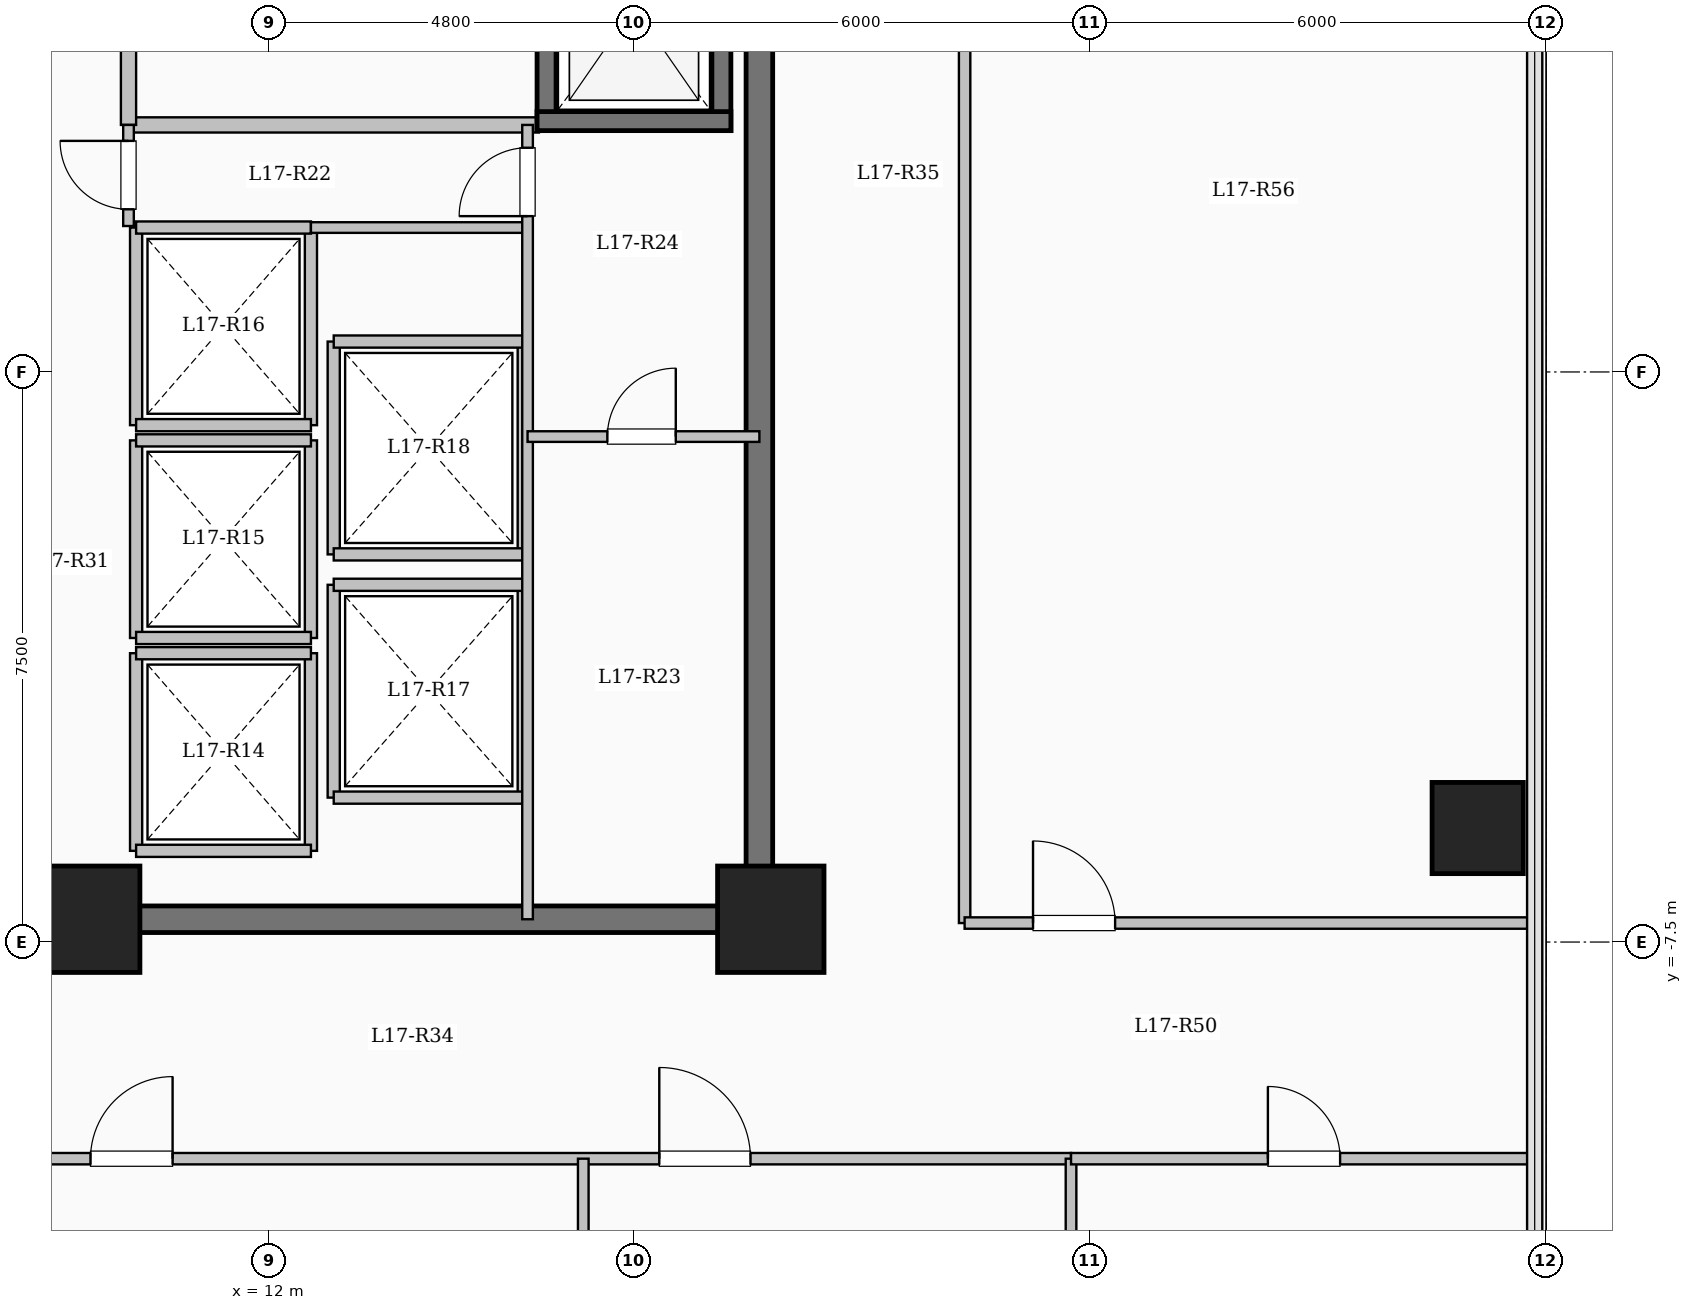
"""IFC4 building model, lengths in metres.
Left out: names, types, materials, properties, quantities, classifications, styles, units other than length and angle.
Written with IfcOpenShell. Run it as: python <this file> out.ifc"""

import sys

from ifc_helpers import new_model, si_unit, direction, frame, frame_2d, origin, origin_2d, place, context, subcontext, project, spatial, rectangle, extrude, element, fill, save


model = new_model("IFC4")
c1 = context("Model", 3, precision=1e-05, world=origin(), true_north=direction((0.0, 1.0)))
c2 = subcontext(c1, "Body", "Model", "MODEL_VIEW")
j1 = project(units=[si_unit("LENGTHUNIT", "METRE"), si_unit("PLANEANGLEUNIT", "RADIAN")], contexts=[c1])
p1 = place(None, origin())
s1 = spatial("IfcSite", under=j1, at=p1, CompositionType="ELEMENT")
p2 = place(p1, origin())
s2 = spatial("IfcBuilding", under=s1, at=p2, CompositionType="ELEMENT")
p3 = place(p2, frame((0.0, 0.0, 64.2)))
s3 = spatial("IfcBuildingStorey", under=s2, at=p3, CompositionType="ELEMENT", Elevation=64.2)
for number, where, z_axis, x_axis in (
    (1, (9.6, -7.2, 0.0), (0.0, 0.0, 1.0), (1.0, 0.0, 0.0)),
    (2, (18.6, -7.2, 0.0), (0.0, 0.0, 1.0), (1.0, 0.0, 0.0)),
):
    element("IfcColumn", number, at=place(p3, frame(where, z_axis=z_axis, x_axis=x_axis)), inside=s3, PredefinedType="COLUMN", context=c2, shape_type="SweptSolid", body=[
        extrude(rectangle(XDim=1.4, YDim=1.4, at=origin_2d()), origin(), (0.0, 0.0, 1.0), 4.5),
    ])
p4 = place(p3, frame((27.9, -6.0, 0.0), z_axis=(0.0, 0.0, 1.0), x_axis=(1.0, 0.0, 0.0)))
e3 = element("IfcColumn", 3, at=p4, inside=s3, PredefinedType="COLUMN", context=c2, shape_type="SweptSolid", body=[
    extrude(rectangle(XDim=1.2, YDim=1.2, at=origin_2d()), origin(), (0.0, 0.0, 1.0), 4.5),
])
p5 = place(p3, frame((10.15, 3.25, 0.0), z_axis=(0.0, 0.0, 1.0), x_axis=(1.0, 0.0, 0.0)))
e4 = element("IfcWall", 4, at=p5, inside=s3, PredefinedType="SOLIDWALL", context=c2, shape_type="SweptSolid", body=[
    extrude(rectangle(XDim=5.4, YDim=0.2, at=frame_2d((2.7, 0.0))), origin(), (0.0, 0.0, 1.0), 4.2),
])
p6 = place(p3, frame((10.15, 3.25, 0.0), z_axis=(0.0, 0.0, 1.0), x_axis=(0.0, 1.0, 0.0)))
e5 = element("IfcWall", 5, at=p6, inside=s3, PredefinedType="SOLIDWALL", context=c2, shape_type="SweptSolid", body=[
    extrude(rectangle(XDim=3.25, YDim=0.2, at=frame_2d((1.625, 0.0))), origin(), (0.0, 0.0, 1.0), 4.2),
])
p7 = place(p6, frame((1.1, 0.0, 0.0)))
e6 = element("IfcOpeningElement", 6, at=p7, cuts=e5, PredefinedType="OPENING", context=c2, shape_type="SweptSolid", body=[
    extrude(rectangle(XDim=1.02, YDim=2.15, at=frame_2d((0.51, 1.075))), frame((0.0, 0.11, 0.0), z_axis=(0.0, -1.0, 0.0), x_axis=(1.0, 0.0, 0.0)), (0.0, 0.0, 1.0), 0.22),
])
p8 = place(p3, frame((15.65, 3.175, 0.0), z_axis=(0.0, 0.0, 1.0), x_axis=(0.0, 1.0, 0.0)))
e7 = element("IfcWall", 7, at=p8, inside=s3, PredefinedType="SHEAR", context=c2, shape_type="SweptSolid", body=[
    extrude(rectangle(XDim=3.25, YDim=0.25, at=frame_2d((1.625, 0.0))), origin(), (0.0, 0.0, 1.0), 4.5),
])
p9 = place(p8, frame((1.075, 0.0, 0.0)))
e8 = element("IfcOpeningElement", 8, at=p9, cuts=e7, PredefinedType="OPENING", context=c2, shape_type="SweptSolid", body=[
    extrude(rectangle(XDim=1.1, YDim=2.15, at=frame_2d((0.55, 1.075))), frame((0.0, 0.135, 0.0), z_axis=(0.0, -1.0, 0.0), x_axis=(1.0, 0.0, 0.0)), (0.0, 0.0, 1.0), 0.27),
])
p10 = place(p3, frame((17.95, 3.175, 0.0), z_axis=(0.0, 0.0, 1.0), x_axis=(0.0, 1.0, 0.0)))
e9 = element("IfcWall", 9, at=p10, inside=s3, PredefinedType="SHEAR", context=c2, shape_type="SweptSolid", body=[
    extrude(rectangle(XDim=3.25, YDim=0.25, at=frame_2d((1.625, 0.0))), origin(), (0.0, 0.0, 1.0), 4.5),
])
p11 = place(p3, frame((15.525, 3.3, 0.0), z_axis=(0.0, 0.0, 1.0), x_axis=(1.0, 0.0, 0.0)))
e10 = element("IfcWall", 10, at=p11, inside=s3, PredefinedType="SHEAR", context=c2, shape_type="SweptSolid", body=[
    extrude(rectangle(XDim=2.55, YDim=0.25, at=frame_2d((1.275, 0.0))), origin(), (0.0, 0.0, 1.0), 4.5),
])
for number, where, z_axis, x_axis in (
    (11, (10.25, -6.3, 0.0), (0.0, 0.0, 1.0), (0.0, 1.0, 0.0)),
    (12, (12.55, -6.3, 0.0), (0.0, 0.0, 1.0), (0.0, 1.0, 0.0)),
):
    element("IfcWall", number, at=place(p3, frame(where, z_axis=z_axis, x_axis=x_axis)), inside=s3, PredefinedType="SOLIDWALL", context=c2, shape_type="SweptSolid", body=[
        extrude(rectangle(XDim=2.6, YDim=0.16, at=frame_2d((1.3, 0.0))), origin(), (0.0, 0.0, 1.0), 4.2),
    ])
for number, where, z_axis, x_axis in (
    (13, (10.25, -6.3, 0.0), (0.0, 0.0, 1.0), (1.0, 0.0, 0.0)),
    (14, (10.25, -3.7, 0.0), (0.0, 0.0, 1.0), (1.0, 0.0, 0.0)),
):
    element("IfcWall", number, at=place(p3, frame(where, z_axis=z_axis, x_axis=x_axis)), inside=s3, PredefinedType="SOLIDWALL", context=c2, shape_type="SweptSolid", body=[
        extrude(rectangle(XDim=2.3, YDim=0.16, at=frame_2d((1.15, 0.0))), origin(), (0.0, 0.0, 1.0), 4.2),
    ])
for number, where, z_axis, x_axis in (
    (15, (10.25, -3.5, 0.0), (0.0, 0.0, 1.0), (0.0, 1.0, 0.0)),
    (16, (12.55, -3.5, 0.0), (0.0, 0.0, 1.0), (0.0, 1.0, 0.0)),
):
    element("IfcWall", number, at=place(p3, frame(where, z_axis=z_axis, x_axis=x_axis)), inside=s3, PredefinedType="SOLIDWALL", context=c2, shape_type="SweptSolid", body=[
        extrude(rectangle(XDim=2.6, YDim=0.16, at=frame_2d((1.3, 0.0))), origin(), (0.0, 0.0, 1.0), 4.2),
    ])
for number, where, z_axis, x_axis in (
    (17, (10.25, -3.5, 0.0), (0.0, 0.0, 1.0), (1.0, 0.0, 0.0)),
    (18, (10.25, -0.9, 0.0), (0.0, 0.0, 1.0), (1.0, 0.0, 0.0)),
):
    element("IfcWall", number, at=place(p3, frame(where, z_axis=z_axis, x_axis=x_axis)), inside=s3, PredefinedType="SOLIDWALL", context=c2, shape_type="SweptSolid", body=[
        extrude(rectangle(XDim=2.3, YDim=0.16, at=frame_2d((1.15, 0.0))), origin(), (0.0, 0.0, 1.0), 4.2),
    ])
for number, where, z_axis, x_axis in (
    (19, (10.25, -0.7, 0.0), (0.0, 0.0, 1.0), (0.0, 1.0, 0.0)),
    (20, (12.55, -0.7, 0.0), (0.0, 0.0, 1.0), (0.0, 1.0, 0.0)),
):
    element("IfcWall", number, at=place(p3, frame(where, z_axis=z_axis, x_axis=x_axis)), inside=s3, PredefinedType="SOLIDWALL", context=c2, shape_type="SweptSolid", body=[
        extrude(rectangle(XDim=2.6, YDim=0.16, at=frame_2d((1.3, 0.0))), origin(), (0.0, 0.0, 1.0), 4.2),
    ])
for number, where, z_axis, x_axis in (
    (21, (10.25, -0.7, 0.0), (0.0, 0.0, 1.0), (1.0, 0.0, 0.0)),
    (22, (10.25, 1.9, 0.0), (0.0, 0.0, 1.0), (1.0, 0.0, 0.0)),
):
    element("IfcWall", number, at=place(p3, frame(where, z_axis=z_axis, x_axis=x_axis)), inside=s3, PredefinedType="SOLIDWALL", context=c2, shape_type="SweptSolid", body=[
        extrude(rectangle(XDim=2.3, YDim=0.16, at=frame_2d((1.15, 0.0))), origin(), (0.0, 0.0, 1.0), 4.2),
    ])
for number, where, z_axis, x_axis in (
    (23, (12.85, -5.6, 0.0), (0.0, 0.0, 1.0), (0.0, 1.0, 0.0)),
    (24, (15.35, -5.6, 0.0), (0.0, 0.0, 1.0), (0.0, 1.0, 0.0)),
):
    element("IfcWall", number, at=place(p3, frame(where, z_axis=z_axis, x_axis=x_axis)), inside=s3, PredefinedType="SOLIDWALL", context=c2, shape_type="SweptSolid", body=[
        extrude(rectangle(XDim=2.8, YDim=0.16, at=frame_2d((1.4, 0.0))), origin(), (0.0, 0.0, 1.0), 4.2),
    ])
for number, where, z_axis, x_axis in (
    (25, (12.85, -5.6, 0.0), (0.0, 0.0, 1.0), (1.0, 0.0, 0.0)),
    (26, (12.85, -2.8, 0.0), (0.0, 0.0, 1.0), (1.0, 0.0, 0.0)),
):
    element("IfcWall", number, at=place(p3, frame(where, z_axis=z_axis, x_axis=x_axis)), inside=s3, PredefinedType="SOLIDWALL", context=c2, shape_type="SweptSolid", body=[
        extrude(rectangle(XDim=2.5, YDim=0.16, at=frame_2d((1.25, 0.0))), origin(), (0.0, 0.0, 1.0), 4.2),
    ])
for number, where, z_axis, x_axis in (
    (27, (12.85, -2.4, 0.0), (0.0, 0.0, 1.0), (0.0, 1.0, 0.0)),
    (28, (15.35, -2.4, 0.0), (0.0, 0.0, 1.0), (0.0, 1.0, 0.0)),
):
    element("IfcWall", number, at=place(p3, frame(where, z_axis=z_axis, x_axis=x_axis)), inside=s3, PredefinedType="SOLIDWALL", context=c2, shape_type="SweptSolid", body=[
        extrude(rectangle(XDim=2.8, YDim=0.16, at=frame_2d((1.4, 0.0))), origin(), (0.0, 0.0, 1.0), 4.2),
    ])
for number, where, z_axis, x_axis in (
    (29, (12.85, -2.4, 0.0), (0.0, 0.0, 1.0), (1.0, 0.0, 0.0)),
    (30, (12.85, 0.4, 0.0), (0.0, 0.0, 1.0), (1.0, 0.0, 0.0)),
):
    element("IfcWall", number, at=place(p3, frame(where, z_axis=z_axis, x_axis=x_axis)), inside=s3, PredefinedType="SOLIDWALL", context=c2, shape_type="SweptSolid", body=[
        extrude(rectangle(XDim=2.5, YDim=0.16, at=frame_2d((1.25, 0.0))), origin(), (0.0, 0.0, 1.0), 4.2),
    ])
p12 = place(p3, frame((18.45, -7.375, 0.0), z_axis=(0.0, 0.0, 1.0), x_axis=(0.0, 1.0, 0.0)))
e31 = element("IfcWall", 31, at=p12, inside=s3, PredefinedType="SHEAR", context=c2, shape_type="SweptSolid", body=[
    extrude(rectangle(XDim=14.05, YDim=0.35, at=frame_2d((7.025, 0.0))), origin(), (0.0, 0.0, 1.0), 4.5),
])
p13 = place(p3, frame((10.075, -7.2, 0.0), z_axis=(0.0, 0.0, 1.0), x_axis=(1.0, 0.0, 0.0)))
e32 = element("IfcWall", 32, at=p13, inside=s3, PredefinedType="SHEAR", context=c2, shape_type="SweptSolid", body=[
    extrude(rectangle(XDim=8.55, YDim=0.35, at=frame_2d((4.275, 0.0))), origin(), (0.0, 0.0, 1.0), 4.5),
])
p14 = place(p3, frame((12.55, 1.9, 0.0), z_axis=(0.0, 0.0, 1.0), x_axis=(1.0, 0.0, 0.0)))
e33 = element("IfcWall", 33, at=p14, inside=s3, PredefinedType="PARTITIONING", context=c2, shape_type="SweptSolid", body=[
    extrude(rectangle(XDim=2.85, YDim=0.14, at=frame_2d((1.425, 0.0))), origin(), (0.0, 0.0, 1.0), 4.2),
])
p15 = place(p3, frame((10.15, 1.92, 0.0), z_axis=(0.0, 0.0, 1.0), x_axis=(0.0, 1.0, 0.0)))
e34 = element("IfcWall", 34, at=p15, inside=s3, PredefinedType="PARTITIONING", context=c2, shape_type="SweptSolid", body=[
    extrude(rectangle(XDim=1.33, YDim=0.14, at=frame_2d((0.665, 0.0))), origin(), (0.0, 0.0, 1.0), 4.2),
])
p16 = place(p15, frame((0.22, 0.0, 0.0)))
e35 = element("IfcOpeningElement", 35, at=p16, cuts=e34, PredefinedType="OPENING", context=c2, shape_type="SweptSolid", body=[
    extrude(rectangle(XDim=0.9, YDim=2.08, at=frame_2d((0.45, 1.04))), frame((0.0, 0.08, 0.0), z_axis=(0.0, -1.0, 0.0), x_axis=(1.0, 0.0, 0.0)), (0.0, 0.0, 1.0), 0.16),
])
p17 = place(p3, frame((15.4, -7.2, 0.0), z_axis=(0.0, 0.0, 1.0), x_axis=(0.0, 1.0, 0.0)))
e36 = element("IfcWall", 36, at=p17, inside=s3, PredefinedType="PARTITIONING", context=c2, shape_type="SweptSolid", body=[
    extrude(rectangle(XDim=10.45, YDim=0.14, at=frame_2d((5.225, 0.0))), origin(), (0.0, 0.0, 1.0), 4.2),
])
p18 = place(p17, frame((9.25, 0.0, 0.0)))
e37 = element("IfcOpeningElement", 37, at=p18, cuts=e36, PredefinedType="OPENING", context=c2, shape_type="SweptSolid", body=[
    extrude(rectangle(XDim=0.9, YDim=2.08, at=frame_2d((0.45, 1.04))), frame((0.0, 0.08, 0.0), z_axis=(0.0, -1.0, 0.0), x_axis=(1.0, 0.0, 0.0)), (0.0, 0.0, 1.0), 0.16),
])
p19 = place(p3, frame((15.4, -0.85, 0.0), z_axis=(0.0, 0.0, 1.0), x_axis=(1.0, 0.0, 0.0)))
e38 = element("IfcWall", 38, at=p19, inside=s3, PredefinedType="PARTITIONING", context=c2, shape_type="SweptSolid", body=[
    extrude(rectangle(XDim=3.05, YDim=0.14, at=frame_2d((1.525, 0.0))), origin(), (0.0, 0.0, 1.0), 4.2),
])
p20 = place(p19, frame((1.05, 0.0, 0.0)))
e39 = element("IfcOpeningElement", 39, at=p20, cuts=e38, PredefinedType="OPENING", context=c2, shape_type="SweptSolid", body=[
    extrude(rectangle(XDim=0.9, YDim=2.08, at=frame_2d((0.45, 1.04))), frame((0.0, 0.08, 0.0), z_axis=(0.0, -1.0, 0.0), x_axis=(1.0, 0.0, 0.0)), (0.0, 0.0, 1.0), 0.16),
])
p21 = place(p3, frame((21.15, -7.25, 0.0), z_axis=(0.0, 0.0, 1.0), x_axis=(0.0, 1.0, 0.0)))
e40 = element("IfcWall", 40, at=p21, inside=s3, PredefinedType="PARTITIONING", context=c2, shape_type="SweptSolid", body=[
    extrude(rectangle(XDim=18.0, YDim=0.15, at=frame_2d((9.0, 0.0))), origin(), (0.0, 0.0, 1.0), 3.635),
])
p22 = place(p3, frame((8.55, -10.35, 0.0), z_axis=(0.0, 0.0, 1.0), x_axis=(1.0, 0.0, 0.0)))
e41 = element("IfcWall", 41, at=p22, inside=s3, PredefinedType="PARTITIONING", context=c2, shape_type="SweptSolid", body=[
    extrude(rectangle(XDim=14.0, YDim=0.15, at=frame_2d((7.0, 0.0))), origin(), (0.0, 0.0, 1.0), 4.2),
])
p23 = place(p22, frame((1.1, 0.0, 0.0)))
e42 = element("IfcOpeningElement", 42, at=p23, cuts=e41, PredefinedType="OPENING", context=c2, shape_type="SweptSolid", body=[
    extrude(rectangle(XDim=1.08, YDim=2.15, at=frame_2d((0.54, 1.075))), frame((0.0, 0.085, 0.0), z_axis=(0.0, -1.0, 0.0), x_axis=(1.0, 0.0, 0.0)), (0.0, 0.0, 1.0), 0.17),
])
p24 = place(p22, frame((8.583, 0.0, 0.0)))
e43 = element("IfcOpeningElement", 43, at=p24, cuts=e41, PredefinedType="OPENING", context=c2, shape_type="SweptSolid", body=[
    extrude(rectangle(XDim=1.2, YDim=2.15, at=frame_2d((0.6, 1.075))), frame((0.0, 0.085, 0.0), z_axis=(0.0, -1.0, 0.0), x_axis=(1.0, 0.0, 0.0)), (0.0, 0.0, 1.0), 0.17),
])
p25 = place(p3, frame((16.133, -23.6, 0.0), z_axis=(0.0, 0.0, 1.0), x_axis=(0.0, 1.0, 0.0)))
e44 = element("IfcWall", 44, at=p25, inside=s3, PredefinedType="PARTITIONING", context=c2, shape_type="SweptSolid", body=[
    extrude(rectangle(XDim=13.25, YDim=0.14, at=frame_2d((6.625, 0.0))), origin(), (0.0, 0.0, 1.0), 4.2),
])
p26 = place(p3, frame((21.15, -7.25, 0.0), z_axis=(0.0, 0.0, 1.0), x_axis=(1.0, 0.0, 0.0)))
e45 = element("IfcWall", 45, at=p26, inside=s3, PredefinedType="PARTITIONING", context=c2, shape_type="SweptSolid", body=[
    extrude(rectangle(XDim=7.53, YDim=0.15, at=frame_2d((3.765, 0.0))), origin(), (0.0, 0.0, 1.0), 4.2),
])
p27 = place(p26, frame((0.9, 0.0, 0.0)))
e46 = element("IfcOpeningElement", 46, at=p27, cuts=e45, PredefinedType="OPENING", context=c2, shape_type="SweptSolid", body=[
    extrude(rectangle(XDim=1.08, YDim=2.15, at=frame_2d((0.54, 1.075))), frame((0.0, 0.085, 0.0), z_axis=(0.0, -1.0, 0.0), x_axis=(1.0, 0.0, 0.0)), (0.0, 0.0, 1.0), 0.17),
])
p28 = place(p3, frame((22.55, -19.05, 0.0), z_axis=(0.0, 0.0, 1.0), x_axis=(0.0, 1.0, 0.0)))
e47 = element("IfcWall", 47, at=p28, inside=s3, PredefinedType="PARTITIONING", context=c2, shape_type="SweptSolid", body=[
    extrude(rectangle(XDim=8.7, YDim=0.14, at=frame_2d((4.35, 0.0))), origin(), (0.0, 0.0, 1.0), 4.2),
])
p29 = place(p3, frame((22.55, -10.35, 0.0), z_axis=(0.0, 0.0, 1.0), x_axis=(1.0, 0.0, 0.0)))
e48 = element("IfcWall", 48, at=p29, inside=s3, PredefinedType="PARTITIONING", context=c2, shape_type="SweptSolid", body=[
    extrude(rectangle(XDim=6.13, YDim=0.15, at=frame_2d((3.065, 0.0))), origin(), (0.0, 0.0, 1.0), 4.2),
])
p30 = place(p29, frame((2.59, 0.0, 0.0)))
e49 = element("IfcOpeningElement", 49, at=p30, cuts=e48, PredefinedType="OPENING", context=c2, shape_type="SweptSolid", body=[
    extrude(rectangle(XDim=0.95, YDim=2.15, at=frame_2d((0.475, 1.075))), frame((0.0, 0.085, 0.0), z_axis=(0.0, -1.0, 0.0), x_axis=(1.0, 0.0, 0.0)), (0.0, 0.0, 1.0), 0.17),
])
p31 = place(p16, origin())
e50 = element("IfcDoor", 50, at=p31, inside=s3, OperationType="SINGLE_SWING_RIGHT", PredefinedType="DOOR", context=c2, shape_type="SweptSolid", body=[
    extrude(rectangle(XDim=0.9, YDim=2.08, at=frame_2d((0.45, 1.04))), frame((0.0, 0.025, 0.0), z_axis=(0.0, -1.0, 0.0), x_axis=(1.0, 0.0, 0.0)), (0.0, 0.0, 1.0), 0.05),
])
fill(e35, e50)
p32 = place(p18, origin())
e51 = element("IfcDoor", 51, at=p32, inside=s3, OperationType="SINGLE_SWING_LEFT", PredefinedType="DOOR", context=c2, shape_type="SweptSolid", body=[
    extrude(rectangle(XDim=0.9, YDim=2.08, at=frame_2d((0.45, 1.04))), frame((0.0, 0.025, 0.0), z_axis=(0.0, -1.0, 0.0), x_axis=(1.0, 0.0, 0.0)), (0.0, 0.0, 1.0), 0.05),
])
fill(e37, e51)
p33 = place(p20, origin())
e52 = element("IfcDoor", 52, at=p33, inside=s3, OperationType="SINGLE_SWING_RIGHT", PredefinedType="DOOR", context=c2, shape_type="SweptSolid", body=[
    extrude(rectangle(XDim=0.9, YDim=2.08, at=frame_2d((0.45, 1.04))), frame((0.0, 0.025, 0.0), z_axis=(0.0, -1.0, 0.0), x_axis=(1.0, 0.0, 0.0)), (0.0, 0.0, 1.0), 0.05),
])
fill(e39, e52)
p34 = place(p23, origin())
e53 = element("IfcDoor", 53, at=p34, inside=s3, OperationType="SINGLE_SWING_RIGHT", PredefinedType="DOOR", context=c2, shape_type="SweptSolid", body=[
    extrude(rectangle(XDim=1.08, YDim=2.15, at=frame_2d((0.54, 1.075))), frame((0.0, 0.025, 0.0), z_axis=(0.0, -1.0, 0.0), x_axis=(1.0, 0.0, 0.0)), (0.0, 0.0, 1.0), 0.05),
])
fill(e42, e53)
p35 = place(p24, origin())
e54 = element("IfcDoor", 54, at=p35, inside=s3, OperationType="SINGLE_SWING_LEFT", PredefinedType="DOOR", context=c2, shape_type="SweptSolid", body=[
    extrude(rectangle(XDim=1.2, YDim=2.15, at=frame_2d((0.6, 1.075))), frame((0.0, 0.025, 0.0), z_axis=(0.0, -1.0, 0.0), x_axis=(1.0, 0.0, 0.0)), (0.0, 0.0, 1.0), 0.05),
])
fill(e43, e54)
p36 = place(p30, origin())
e55 = element("IfcDoor", 55, at=p36, inside=s3, OperationType="SINGLE_SWING_LEFT", PredefinedType="DOOR", context=c2, shape_type="SweptSolid", body=[
    extrude(rectangle(XDim=0.95, YDim=2.15, at=frame_2d((0.475, 1.075))), frame((0.0, 0.025, 0.0), z_axis=(0.0, -1.0, 0.0), x_axis=(1.0, 0.0, 0.0)), (0.0, 0.0, 1.0), 0.05),
])
fill(e49, e55)
p37 = place(p27, origin())
e56 = element("IfcDoor", 56, at=p37, inside=s3, OperationType="SINGLE_SWING_LEFT", PredefinedType="DOOR", context=c2, shape_type="SweptSolid", body=[
    extrude(rectangle(XDim=1.08, YDim=2.15, at=frame_2d((0.54, 1.075))), frame((0.0, 0.025, 0.0), z_axis=(0.0, -1.0, 0.0), x_axis=(1.0, 0.0, 0.0)), (0.0, 0.0, 1.0), 0.05),
])
fill(e46, e56)
save(model, sys.argv[1])
